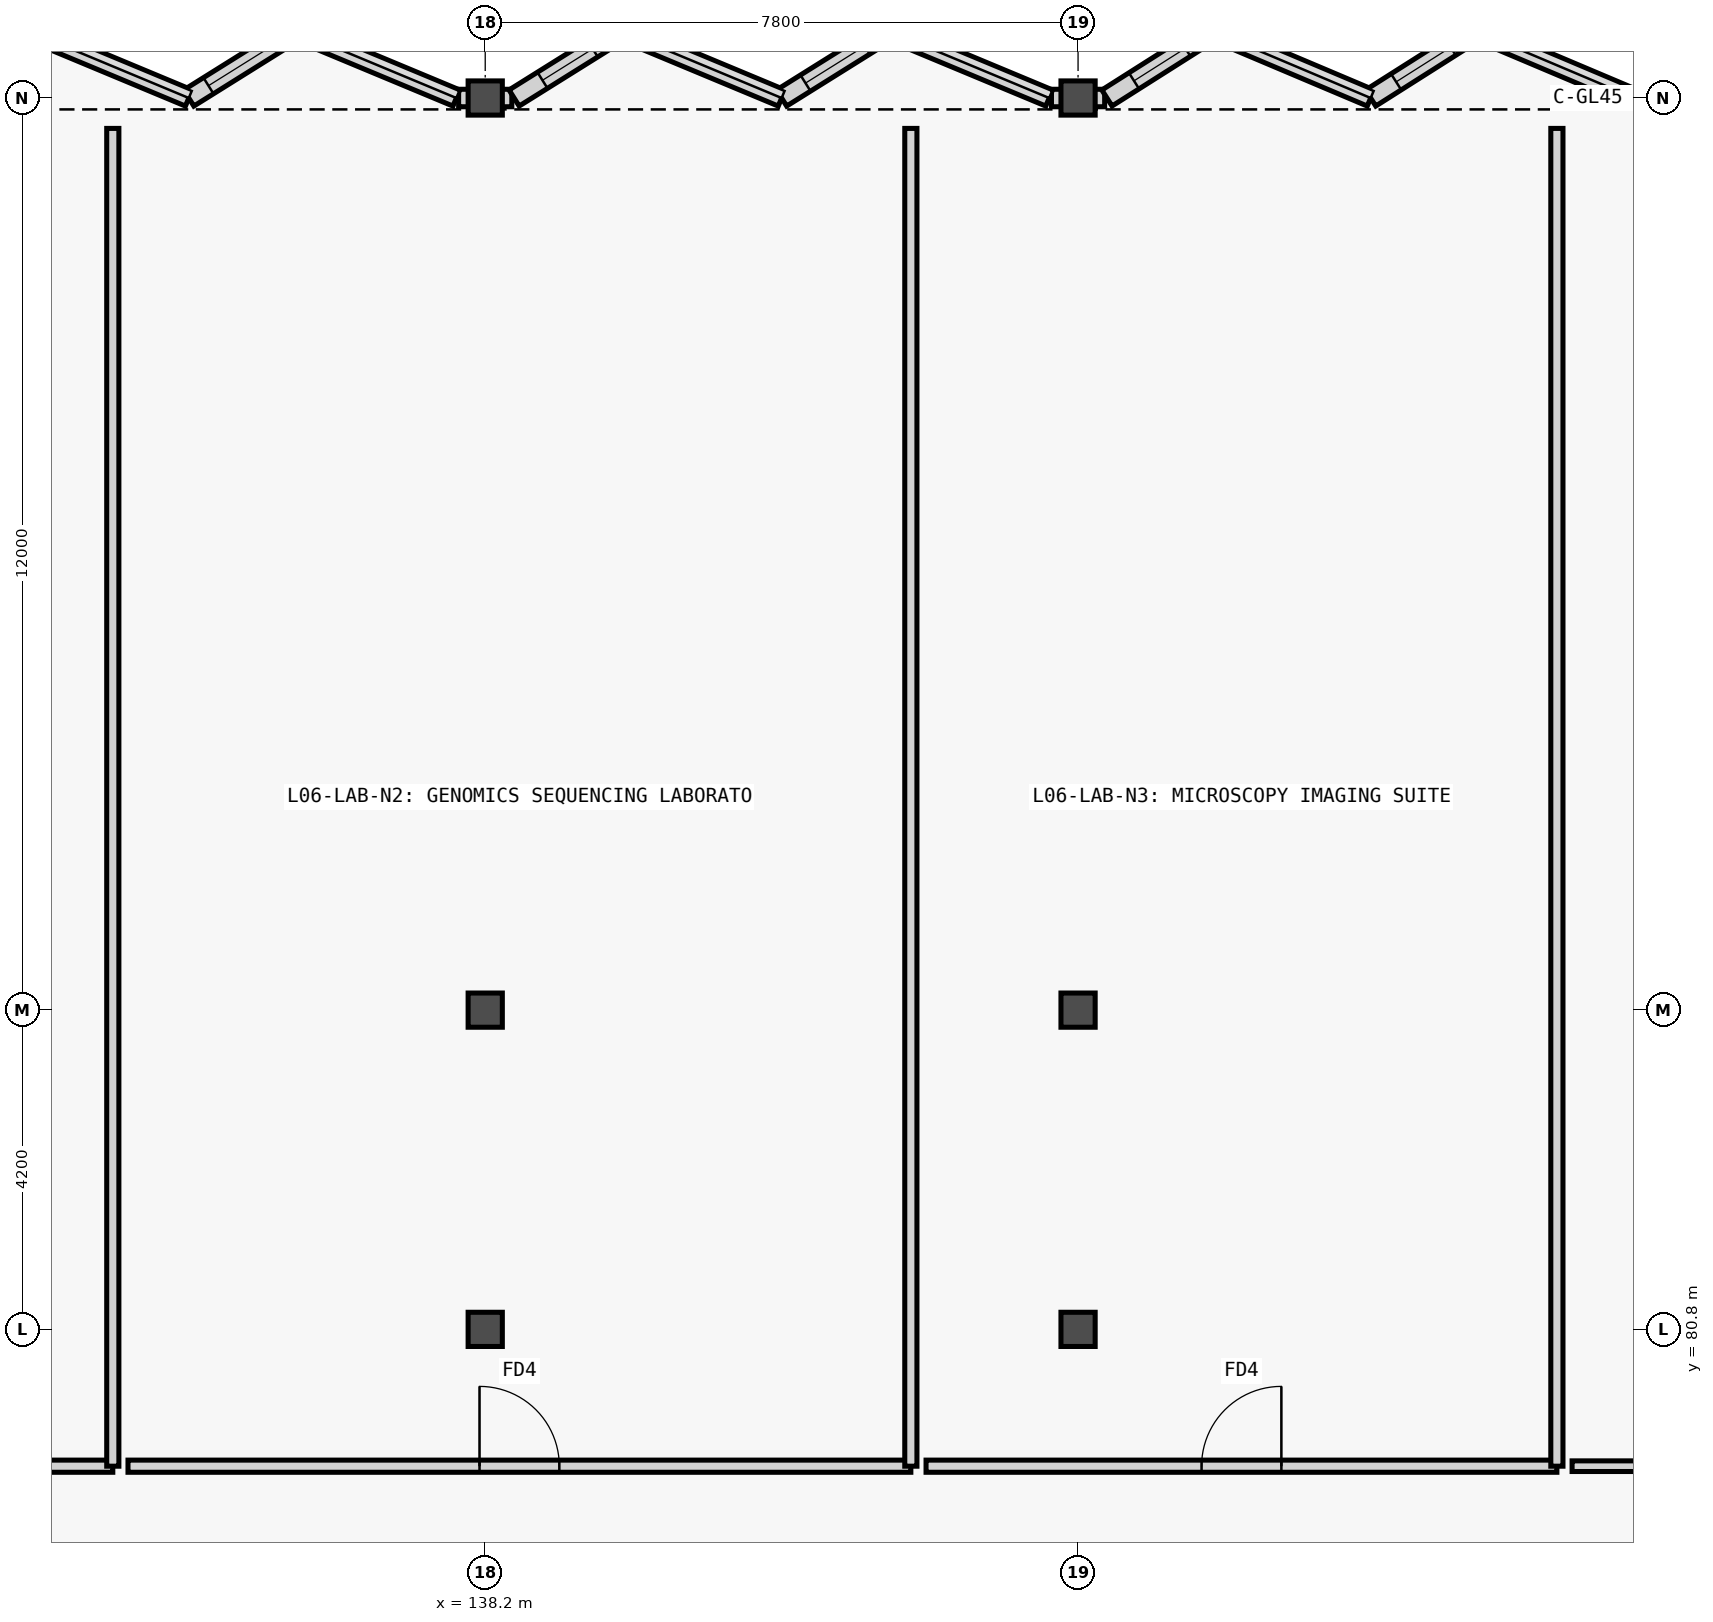
"""IFC4 building model, lengths in metres.
Left out: names, types, materials, properties, quantities, classifications, styles, units other than length and angle.
Written with IfcOpenShell. Run it as: python <this file> out.ifc"""

import sys

from ifc_helpers import new_model, si_unit, direction, frame, frame_2d, origin, origin_2d, place, context, subcontext, project, spatial, rectangle, extrude, element, fill, save


model = new_model("IFC4")
c1 = context("Model", 3, precision=1e-05, world=origin(), true_north=direction((0.0, 1.0)))
c2 = subcontext(c1, "Body", "Model", "MODEL_VIEW")
j1 = project(units=[si_unit("LENGTHUNIT", "METRE"), si_unit("PLANEANGLEUNIT", "RADIAN")], contexts=[c1])
p1 = place(None, origin())
s1 = spatial("IfcSite", under=j1, at=p1, CompositionType="ELEMENT")
p2 = place(p1, origin())
s2 = spatial("IfcBuilding", under=s1, at=p2, CompositionType="ELEMENT")
p3 = place(p2, frame((0.0, 0.0, 25.2)))
s3 = spatial("IfcBuildingStorey", under=s2, at=p3, CompositionType="ELEMENT", Elevation=25.2)
for number, where, z_axis, x_axis in (
    (1, (138.2, 80.8, 0.0), (0.0, 0.0, 1.0), (1.0, 0.0, 0.0)),
    (2, (138.2, 85.0, 0.0), (0.0, 0.0, 1.0), (1.0, 0.0, 0.0)),
    (3, (138.2, 97.0, 0.0), (0.0, 0.0, 1.0), (1.0, 0.0, 0.0)),
    (4, (146.0, 80.8, 0.0), (0.0, 0.0, 1.0), (1.0, 0.0, 0.0)),
    (5, (146.0, 85.0, 0.0), (0.0, 0.0, 1.0), (1.0, 0.0, 0.0)),
    (6, (146.0, 97.0, 0.0), (0.0, 0.0, 1.0), (1.0, 0.0, 0.0)),
):
    element("IfcColumn", number, at=place(p3, frame(where, z_axis=z_axis, x_axis=x_axis)), inside=s3, PredefinedType="COLUMN", context=c2, shape_type="SweptSolid", body=[
        extrude(rectangle(XDim=0.45, YDim=0.45, at=origin_2d()), origin(), (0.0, 0.0, 1.0), 3.6),
    ])
p4 = place(p3, frame((137.85, 97.0, 0.0), z_axis=(0.0, 0.0, 1.0), x_axis=(1.0, 0.0, 0.0)))
e7 = element("IfcWall", 7, at=p4, inside=s3, PredefinedType="SOLIDWALL", context=c2, shape_type="SweptSolid", body=[
    extrude(rectangle(XDim=0.35, YDim=0.23, at=frame_2d((0.175, 0.0))), origin(), (0.0, 0.0, 1.0), 3.36),
])
for number, where, z_axis, x_axis in (
    (8, (138.2, 97.0, 0.0), (0.0, 0.0, 1.0), (1.0, 0.0, 0.0)),
    (9, (145.65, 97.0, 0.0), (0.0, 0.0, 1.0), (1.0, 0.0, 0.0)),
    (10, (146.0, 97.0, 0.0), (0.0, 0.0, 1.0), (1.0, 0.0, 0.0)),
):
    element("IfcWall", number, at=place(p3, frame(where, z_axis=z_axis, x_axis=x_axis)), inside=s3, PredefinedType="SOLIDWALL", context=c2, shape_type="SweptSolid", body=[
        extrude(rectangle(XDim=0.35, YDim=0.23, at=frame_2d((0.175, 0.0))), origin(), (0.0, 0.0, 1.0), 3.36),
    ])
p5 = place(p3, frame((132.188, 97.88, 0.0), z_axis=(0.0, 0.0, 1.0), x_axis=(0.92309902008, -0.384562347517, 0.0)))
e11 = element("IfcWall", 11, at=p5, inside=s3, PredefinedType="SOLIDWALL", context=c2, shape_type="SweptSolid", body=[
    extrude(rectangle(XDim=2.288, YDim=0.23, at=frame_2d((1.144, 0.0))), origin(), (0.0, 0.0, 1.0), 3.36),
])
p6 = place(p3, frame((134.3, 97.0, 0.0), z_axis=(0.0, 0.0, 1.0), x_axis=(0.848023086369, 0.529959286158, 0.0)))
e12 = element("IfcWall", 12, at=p6, inside=s3, PredefinedType="SOLIDWALL", context=c2, shape_type="SweptSolid", body=[
    extrude(rectangle(XDim=1.66, YDim=0.25, at=frame_2d((0.83, 0.0))), origin(), (0.0, 0.0, 1.0), 3.36),
])
p7 = place(p6, frame((0.305, 0.0, 0.82)))
e13 = element("IfcOpeningElement", 13, at=p7, cuts=e12, PredefinedType="OPENING", context=c2, shape_type="SweptSolid", body=[
    extrude(rectangle(XDim=1.05, YDim=1.4, at=frame_2d((0.525, 0.7))), frame((0.0, 0.135, 0.0), z_axis=(0.0, -1.0, 0.0), x_axis=(1.0, 0.0, 0.0)), (0.0, 0.0, 1.0), 0.27),
])
p8 = place(p3, frame((135.708, 97.88, 0.0), z_axis=(0.0, 0.0, 1.0), x_axis=(0.92309902008, -0.384562347517, 0.0)))
e14 = element("IfcWall", 14, at=p8, inside=s3, PredefinedType="SOLIDWALL", context=c2, shape_type="SweptSolid", body=[
    extrude(rectangle(XDim=2.288, YDim=0.23, at=frame_2d((1.144, 0.0))), origin(), (0.0, 0.0, 1.0), 3.36),
])
p9 = place(p3, frame((138.58, 97.0, 0.0), z_axis=(0.0, 0.0, 1.0), x_axis=(0.848023086369, 0.529959286158, 0.0)))
e15 = element("IfcWall", 15, at=p9, inside=s3, PredefinedType="SOLIDWALL", context=c2, shape_type="SweptSolid", body=[
    extrude(rectangle(XDim=1.66, YDim=0.25, at=frame_2d((0.83, 0.0))), origin(), (0.0, 0.0, 1.0), 3.36),
])
p10 = place(p9, frame((0.44, 0.0, 0.82)))
e16 = element("IfcOpeningElement", 16, at=p10, cuts=e15, PredefinedType="OPENING", context=c2, shape_type="SweptSolid", body=[
    extrude(rectangle(XDim=0.78, YDim=1.3, at=frame_2d((0.39, 0.65))), frame((0.0, 0.135, 0.0), z_axis=(0.0, -1.0, 0.0), x_axis=(1.0, 0.0, 0.0)), (0.0, 0.0, 1.0), 0.27),
])
p11 = place(p3, frame((139.988, 97.88, 0.0), z_axis=(0.0, 0.0, 1.0), x_axis=(0.92309902008, -0.384562347517, 0.0)))
e17 = element("IfcWall", 17, at=p11, inside=s3, PredefinedType="SOLIDWALL", context=c2, shape_type="SweptSolid", body=[
    extrude(rectangle(XDim=2.288, YDim=0.23, at=frame_2d((1.144, 0.0))), origin(), (0.0, 0.0, 1.0), 3.36),
])
p12 = place(p3, frame((142.1, 97.0, 0.0), z_axis=(0.0, 0.0, 1.0), x_axis=(0.848023086369, 0.529959286158, 0.0)))
e18 = element("IfcWall", 18, at=p12, inside=s3, PredefinedType="SOLIDWALL", context=c2, shape_type="SweptSolid", body=[
    extrude(rectangle(XDim=1.66, YDim=0.25, at=frame_2d((0.83, 0.0))), origin(), (0.0, 0.0, 1.0), 3.36),
])
p13 = place(p12, frame((0.37, 0.0, 0.82)))
e19 = element("IfcOpeningElement", 19, at=p13, cuts=e18, PredefinedType="OPENING", context=c2, shape_type="SweptSolid", body=[
    extrude(rectangle(XDim=0.92, YDim=1.38, at=frame_2d((0.46, 0.69))), frame((0.0, 0.135, 0.0), z_axis=(0.0, -1.0, 0.0), x_axis=(1.0, 0.0, 0.0)), (0.0, 0.0, 1.0), 0.27),
])
p14 = place(p3, frame((143.508, 97.88, 0.0), z_axis=(0.0, 0.0, 1.0), x_axis=(0.92309902008, -0.384562347517, 0.0)))
e20 = element("IfcWall", 20, at=p14, inside=s3, PredefinedType="SOLIDWALL", context=c2, shape_type="SweptSolid", body=[
    extrude(rectangle(XDim=2.288, YDim=0.23, at=frame_2d((1.144, 0.0))), origin(), (0.0, 0.0, 1.0), 3.36),
])
p15 = place(p3, frame((146.38, 97.0, 0.0), z_axis=(0.0, 0.0, 1.0), x_axis=(0.844626536799, 0.535355968805, 0.0)))
e21 = element("IfcWall", 21, at=p15, inside=s3, PredefinedType="SOLIDWALL", context=c2, shape_type="SweptSolid", body=[
    extrude(rectangle(XDim=1.644, YDim=0.25, at=frame_2d((0.822, 0.0))), origin(), (0.0, 0.0, 1.0), 3.36),
])
p16 = place(p15, frame((0.422, 0.0, 0.82)))
e22 = element("IfcOpeningElement", 22, at=p16, cuts=e21, PredefinedType="OPENING", context=c2, shape_type="SweptSolid", body=[
    extrude(rectangle(XDim=0.8, YDim=1.35, at=frame_2d((0.4, 0.675))), frame((0.0, 0.135, 0.0), z_axis=(0.0, -1.0, 0.0), x_axis=(1.0, 0.0, 0.0)), (0.0, 0.0, 1.0), 0.27),
])
p17 = place(p3, frame((147.768, 97.88, 0.0), z_axis=(0.0, 0.0, 1.0), x_axis=(0.921122216024, -0.389273506866, 0.0)))
e23 = element("IfcWall", 23, at=p17, inside=s3, PredefinedType="SOLIDWALL", context=c2, shape_type="SweptSolid", body=[
    extrude(rectangle(XDim=2.26, YDim=0.23, at=frame_2d((1.13, 0.0))), origin(), (0.0, 0.0, 1.0), 3.36),
])
p18 = place(p3, frame((149.85, 97.0, 0.0), z_axis=(0.0, 0.0, 1.0), x_axis=(0.844583954912, 0.535423143976, 0.0)))
e24 = element("IfcWall", 24, at=p18, inside=s3, PredefinedType="SOLIDWALL", context=c2, shape_type="SweptSolid", body=[
    extrude(rectangle(XDim=1.643, YDim=0.25, at=frame_2d((0.822, 0.0))), origin(), (0.0, 0.0, 1.0), 3.36),
])
p19 = place(p18, frame((0.397, 0.0, 0.82)))
e25 = element("IfcOpeningElement", 25, at=p19, cuts=e24, PredefinedType="OPENING", context=c2, shape_type="SweptSolid", body=[
    extrude(rectangle(XDim=0.85, YDim=1.4, at=frame_2d((0.425, 0.7))), frame((0.0, 0.135, 0.0), z_axis=(0.0, -1.0, 0.0), x_axis=(1.0, 0.0, 0.0)), (0.0, 0.0, 1.0), 0.27),
])
p20 = place(p3, frame((151.238, 97.88, 0.0), z_axis=(0.0, 0.0, 1.0), x_axis=(0.921122216024, -0.389273506866, 0.0)))
e26 = element("IfcWall", 26, at=p20, inside=s3, PredefinedType="SOLIDWALL", context=c2, shape_type="SweptSolid", body=[
    extrude(rectangle(XDim=2.26, YDim=0.23, at=frame_2d((1.13, 0.0))), origin(), (0.0, 0.0, 1.0), 3.36),
])
p21 = place(p3, frame((122.8, 79.0, 0.0), z_axis=(0.0, 0.0, 1.0), x_axis=(1.0, 0.0, 0.0)))
e27 = element("IfcWall", 27, at=p21, inside=s3, PredefinedType="PARTITIONING", context=c2, shape_type="SweptSolid", body=[
    extrude(rectangle(XDim=10.5, YDim=0.16, at=frame_2d((5.25, 0.0))), origin(), (0.0, 0.0, 1.0), 3.34),
])
p22 = place(p21, frame((4.625, 0.0, 0.0)))
e28 = element("IfcOpeningElement", 28, at=p22, cuts=e27, PredefinedType="OPENING", context=c2, shape_type="SweptSolid", body=[
    extrude(rectangle(XDim=1.25, YDim=2.2, at=frame_2d((0.625, 1.1))), frame((0.0, 0.09, 0.0), z_axis=(0.0, -1.0, 0.0), x_axis=(1.0, 0.0, 0.0)), (0.0, 0.0, 1.0), 0.18),
])
p23 = place(p3, frame((133.3, 79.0, 0.0), z_axis=(0.0, 0.0, 1.0), x_axis=(0.0, 1.0, 0.0)))
e29 = element("IfcWall", 29, at=p23, inside=s3, PredefinedType="PARTITIONING", context=c2, shape_type="SweptSolid", body=[
    extrude(rectangle(XDim=17.6, YDim=0.16, at=frame_2d((8.8, 0.0))), origin(), (0.0, 0.0, 1.0), 3.34),
])
p24 = place(p3, frame((133.5, 79.0, 0.0), z_axis=(0.0, 0.0, 1.0), x_axis=(1.0, 0.0, 0.0)))
e30 = element("IfcWall", 30, at=p24, inside=s3, PredefinedType="PARTITIONING", context=c2, shape_type="SweptSolid", body=[
    extrude(rectangle(XDim=10.3, YDim=0.16, at=frame_2d((5.15, 0.0))), origin(), (0.0, 0.0, 1.0), 3.34),
])
p25 = place(p24, frame((4.625, 0.0, 0.0)))
e31 = element("IfcOpeningElement", 31, at=p25, cuts=e30, PredefinedType="OPENING", context=c2, shape_type="SweptSolid", body=[
    extrude(rectangle(XDim=1.05, YDim=2.15, at=frame_2d((0.525, 1.075))), frame((0.0, 0.09, 0.0), z_axis=(0.0, -1.0, 0.0), x_axis=(1.0, 0.0, 0.0)), (0.0, 0.0, 1.0), 0.18),
])
p26 = place(p3, frame((143.8, 79.0, 0.0), z_axis=(0.0, 0.0, 1.0), x_axis=(0.0, 1.0, 0.0)))
e32 = element("IfcWall", 32, at=p26, inside=s3, PredefinedType="PARTITIONING", context=c2, shape_type="SweptSolid", body=[
    extrude(rectangle(XDim=17.6, YDim=0.16, at=frame_2d((8.8, 0.0))), origin(), (0.0, 0.0, 1.0), 3.34),
])
p27 = place(p3, frame((144.0, 79.0, 0.0), z_axis=(0.0, 0.0, 1.0), x_axis=(1.0, 0.0, 0.0)))
e33 = element("IfcWall", 33, at=p27, inside=s3, PredefinedType="PARTITIONING", context=c2, shape_type="SweptSolid", body=[
    extrude(rectangle(XDim=8.3, YDim=0.16, at=frame_2d((4.15, 0.0))), origin(), (0.0, 0.0, 1.0), 3.34),
])
p28 = place(p27, frame((3.625, 0.0, 0.0)))
e34 = element("IfcOpeningElement", 34, at=p28, cuts=e33, PredefinedType="OPENING", context=c2, shape_type="SweptSolid", body=[
    extrude(rectangle(XDim=1.05, YDim=2.15, at=frame_2d((0.525, 1.075))), frame((0.0, 0.09, 0.0), z_axis=(0.0, -1.0, 0.0), x_axis=(1.0, 0.0, 0.0)), (0.0, 0.0, 1.0), 0.18),
])
p29 = place(p3, frame((152.3, 79.0, 0.0), z_axis=(0.0, 0.0, 1.0), x_axis=(0.0, 1.0, 0.0)))
e35 = element("IfcWall", 35, at=p29, inside=s3, PredefinedType="PARTITIONING", context=c2, shape_type="SweptSolid", body=[
    extrude(rectangle(XDim=17.6, YDim=0.16, at=frame_2d((8.8, 0.0))), origin(), (0.0, 0.0, 1.0), 3.34),
])
p30 = place(p3, frame((152.5, 79.0, 0.0), z_axis=(0.0, 0.0, 1.0), x_axis=(1.0, 0.0, 0.0)))
e36 = element("IfcWall", 36, at=p30, inside=s3, PredefinedType="PARTITIONING", context=c2, shape_type="SweptSolid", body=[
    extrude(rectangle(XDim=8.1, YDim=0.14, at=frame_2d((4.05, 0.0))), origin(), (0.0, 0.0, 1.0), 3.34),
])
p31 = place(p30, frame((3.49, 0.0, 0.0)))
e37 = element("IfcOpeningElement", 37, at=p31, cuts=e36, PredefinedType="OPENING", context=c2, shape_type="SweptSolid", body=[
    extrude(rectangle(XDim=1.12, YDim=2.15, at=frame_2d((0.56, 1.075))), frame((0.0, 0.08, 0.0), z_axis=(0.0, -1.0, 0.0), x_axis=(1.0, 0.0, 0.0)), (0.0, 0.0, 1.0), 0.16),
])
p32 = place(p7, origin())
e38 = element("IfcWindow", 38, at=p32, inside=s3, PartitioningType="SINGLE_PANEL", PredefinedType="WINDOW", context=c2, shape_type="SweptSolid", body=[
    extrude(rectangle(XDim=1.05, YDim=1.4, at=frame_2d((0.525, 0.7))), frame((0.0, 0.03, 0.0), z_axis=(0.0, -1.0, 0.0), x_axis=(1.0, 0.0, 0.0)), (0.0, 0.0, 1.0), 0.06),
])
fill(e13, e38)
p33 = place(p10, origin())
e39 = element("IfcWindow", 39, at=p33, inside=s3, PartitioningType="SINGLE_PANEL", PredefinedType="WINDOW", context=c2, shape_type="SweptSolid", body=[
    extrude(rectangle(XDim=0.78, YDim=1.3, at=frame_2d((0.39, 0.65))), frame((0.0, 0.03, 0.0), z_axis=(0.0, -1.0, 0.0), x_axis=(1.0, 0.0, 0.0)), (0.0, 0.0, 1.0), 0.06),
])
fill(e16, e39)
p34 = place(p13, origin())
e40 = element("IfcWindow", 40, at=p34, inside=s3, PartitioningType="SINGLE_PANEL", PredefinedType="WINDOW", context=c2, shape_type="SweptSolid", body=[
    extrude(rectangle(XDim=0.92, YDim=1.38, at=frame_2d((0.46, 0.69))), frame((0.0, 0.03, 0.0), z_axis=(0.0, -1.0, 0.0), x_axis=(1.0, 0.0, 0.0)), (0.0, 0.0, 1.0), 0.06),
])
fill(e19, e40)
p35 = place(p16, origin())
e41 = element("IfcWindow", 41, at=p35, inside=s3, PartitioningType="SINGLE_PANEL", PredefinedType="WINDOW", context=c2, shape_type="SweptSolid", body=[
    extrude(rectangle(XDim=0.8, YDim=1.35, at=frame_2d((0.4, 0.675))), frame((0.0, 0.03, 0.0), z_axis=(0.0, -1.0, 0.0), x_axis=(1.0, 0.0, 0.0)), (0.0, 0.0, 1.0), 0.06),
])
fill(e22, e41)
p36 = place(p19, origin())
e42 = element("IfcWindow", 42, at=p36, inside=s3, PartitioningType="SINGLE_PANEL", PredefinedType="WINDOW", context=c2, shape_type="SweptSolid", body=[
    extrude(rectangle(XDim=0.85, YDim=1.4, at=frame_2d((0.425, 0.7))), frame((0.0, 0.03, 0.0), z_axis=(0.0, -1.0, 0.0), x_axis=(1.0, 0.0, 0.0)), (0.0, 0.0, 1.0), 0.06),
])
fill(e25, e42)
p37 = place(p25, origin())
e43 = element("IfcDoor", 43, at=p37, inside=s3, OperationType="SINGLE_SWING_LEFT", PredefinedType="DOOR", context=c2, shape_type="SweptSolid", body=[
    extrude(rectangle(XDim=1.05, YDim=2.15, at=frame_2d((0.525, 1.075))), frame((0.0, 0.025, 0.0), z_axis=(0.0, -1.0, 0.0), x_axis=(1.0, 0.0, 0.0)), (0.0, 0.0, 1.0), 0.05),
])
fill(e31, e43)
p38 = place(p28, origin())
e44 = element("IfcDoor", 44, at=p38, inside=s3, OperationType="SINGLE_SWING_RIGHT", PredefinedType="DOOR", context=c2, shape_type="SweptSolid", body=[
    extrude(rectangle(XDim=1.05, YDim=2.15, at=frame_2d((0.525, 1.075))), frame((0.0, 0.025, 0.0), z_axis=(0.0, -1.0, 0.0), x_axis=(1.0, 0.0, 0.0)), (0.0, 0.0, 1.0), 0.05),
])
fill(e34, e44)
save(model, sys.argv[1])
